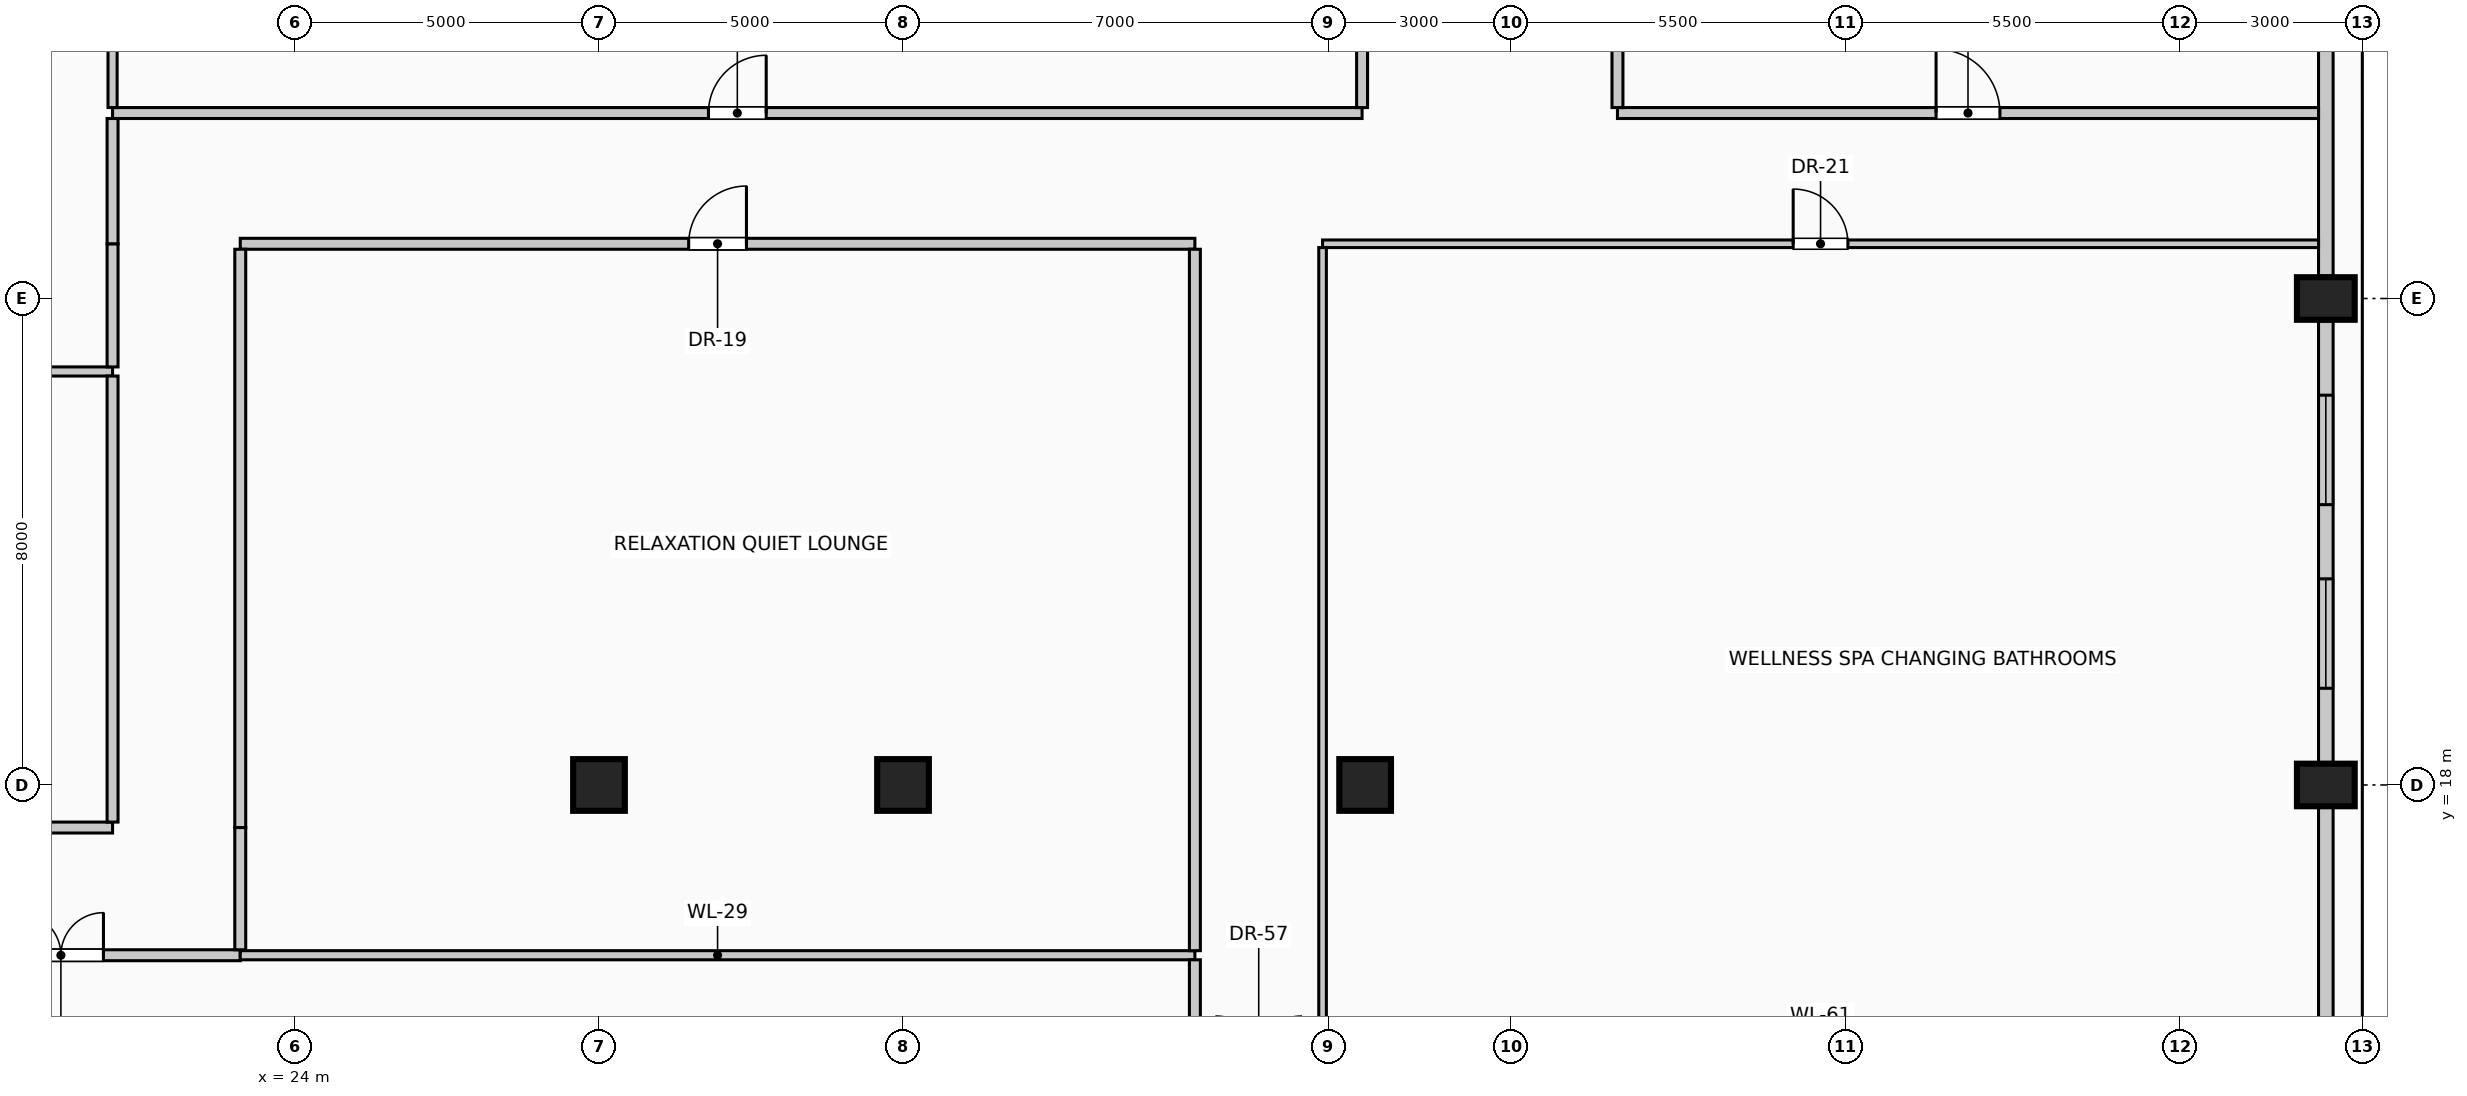
"""IFC4 building model, lengths in metres.
Left out: names, types, materials, properties, quantities, classifications, styles, units other than length and angle.
Written with IfcOpenShell. Run it as: python <this file> out.ifc"""

import sys

from ifc_helpers import new_model, si_unit, direction, frame, frame_2d, origin, origin_2d, place, context, subcontext, project, spatial, rectangle, circle, extrude, element, fill, save


model = new_model("IFC4")
c1 = context("Model", 3, precision=1e-05, world=origin(), true_north=direction((0.0, 1.0)))
c2 = subcontext(c1, "Body", "Model", "MODEL_VIEW")
j1 = project(units=[si_unit("LENGTHUNIT", "METRE"), si_unit("PLANEANGLEUNIT", "RADIAN")], contexts=[c1])
p1 = place(None, origin())
s1 = spatial("IfcSite", under=j1, at=p1, CompositionType="ELEMENT")
p2 = place(p1, origin())
s2 = spatial("IfcBuilding", under=s1, at=p2, CompositionType="ELEMENT")
p3 = place(p2, frame((0.0, 0.0, 280.6)))
s3 = spatial("IfcBuildingStorey", under=s2, at=p3, CompositionType="ELEMENT", Elevation=280.6)
for number, where, z_axis, x_axis in (
    (1, (57.4, 18.0, 0.0), (0.0, 0.0, 1.0), (0.0, 1.0, 0.0)),
    (2, (57.4, 26.0, 0.0), (0.0, 0.0, 1.0), (0.0, 1.0, 0.0)),
):
    element("IfcColumn", number, at=place(p3, frame(where, z_axis=z_axis, x_axis=x_axis)), inside=s3, PredefinedType="COLUMN", context=c2, shape_type="SweptSolid", body=[
        extrude(rectangle(XDim=0.7, YDim=0.95, at=origin_2d()), origin(), (0.0, 0.0, 1.0), 4.4),
    ])
for number, where, z_axis, x_axis in (
    (3, (29.0, 18.0, 0.0), (0.0, 0.0, 1.0), (1.0, 0.0, 0.0)),
    (4, (41.6, 18.0, 0.0), (0.0, 0.0, 1.0), (1.0, 0.0, 0.0)),
    (5, (34.0, 18.0, 0.0), (0.0, 0.0, 1.0), (1.0, 0.0, 0.0)),
):
    element("IfcColumn", number, at=place(p3, frame(where, z_axis=z_axis, x_axis=x_axis)), inside=s3, PredefinedType="COLUMN", context=c2, shape_type="SweptSolid", body=[
        extrude(circle(Radius=0.425, at=origin_2d()), origin(), (0.0, 0.0, 1.0), 4.4),
    ])
p4 = place(p3, frame((57.4, 17.63, 0.0), z_axis=(0.0, 0.0, 1.0), x_axis=(0.0, -1.0, 0.0)))
e6 = element("IfcWall", 6, at=p4, inside=s3, PredefinedType="SOLIDWALL", context=c2, shape_type="SweptSolid", body=[
    extrude(rectangle(XDim=7.26, YDim=0.24, at=frame_2d((3.63, 0.0))), origin(), (0.0, 0.0, 1.0), 3.4),
])
p5 = place(p3, frame((57.4, 25.63, 0.0), z_axis=(0.0, 0.0, 1.0), x_axis=(0.0, -1.0, 0.0)))
e7 = element("IfcWall", 7, at=p5, inside=s3, PredefinedType="SOLIDWALL", context=c2, shape_type="SweptSolid", body=[
    extrude(rectangle(XDim=7.26, YDim=0.24, at=frame_2d((3.63, 0.0))), origin(), (0.0, 0.0, 1.0), 3.4),
])
p6 = place(p5, frame((1.22, 0.0, 0.42)))
e8 = element("IfcOpeningElement", 8, at=p6, cuts=e7, PredefinedType="OPENING", context=c2, shape_type="SweptSolid", body=[
    extrude(rectangle(XDim=1.8, YDim=2.2, at=frame_2d((0.9, 1.1))), frame((0.0, 0.13, 0.0), z_axis=(0.0, -1.0, 0.0), x_axis=(1.0, 0.0, 0.0)), (0.0, 0.0, 1.0), 0.26),
])
p7 = place(p5, frame((4.24, 0.0, 0.42)))
e9 = element("IfcOpeningElement", 9, at=p7, cuts=e7, PredefinedType="OPENING", context=c2, shape_type="SweptSolid", body=[
    extrude(rectangle(XDim=1.8, YDim=2.2, at=frame_2d((0.9, 1.1))), frame((0.0, 0.13, 0.0), z_axis=(0.0, -1.0, 0.0), x_axis=(1.0, 0.0, 0.0)), (0.0, 0.0, 1.0), 0.26),
])
p8 = place(p3, frame((57.4, 33.63, 0.0), z_axis=(0.0, 0.0, 1.0), x_axis=(0.0, -1.0, 0.0)))
e10 = element("IfcWall", 10, at=p8, inside=s3, PredefinedType="SOLIDWALL", context=c2, shape_type="SweptSolid", body=[
    extrude(rectangle(XDim=7.26, YDim=0.24, at=frame_2d((3.63, 0.0))), origin(), (0.0, 0.0, 1.0), 3.4),
])
p9 = place(p3, frame((17.2, 15.2, 0.0), z_axis=(0.0, 0.0, 1.0), x_axis=(1.0, 0.0, 0.0)))
e11 = element("IfcWall", 11, at=p9, inside=s3, PredefinedType="PARTITIONING", context=c2, shape_type="SweptSolid", body=[
    extrude(rectangle(XDim=5.9, YDim=0.18, at=frame_2d((2.95, 0.0))), origin(), (0.0, 0.0, 1.0), 4.15),
])
p10 = place(p9, frame((2.25, 0.0, 0.0)))
e12 = element("IfcOpeningElement", 12, at=p10, cuts=e11, PredefinedType="OPENING", context=c2, shape_type="SweptSolid", body=[
    extrude(rectangle(XDim=1.4, YDim=2.2, at=frame_2d((0.7, 1.1))), frame((0.0, 0.1, 0.0), z_axis=(0.0, -1.0, 0.0), x_axis=(1.0, 0.0, 0.0)), (0.0, 0.0, 1.0), 0.2),
])
p11 = place(p3, frame((23.1, 15.2, 0.0), z_axis=(0.0, 0.0, 1.0), x_axis=(1.0, 0.0, 0.0)))
e13 = element("IfcWall", 13, at=p11, inside=s3, PredefinedType="PARTITIONING", context=c2, shape_type="SweptSolid", body=[
    extrude(rectangle(XDim=15.7, YDim=0.15, at=frame_2d((7.85, 0.0))), origin(), (0.0, 0.0, 1.0), 4.15),
])
p12 = place(p3, frame((15.85, 17.3, 0.0), z_axis=(0.0, 0.0, 1.0), x_axis=(1.0, 0.0, 0.0)))
e14 = element("IfcWall", 14, at=p12, inside=s3, PredefinedType="PARTITIONING", context=c2, shape_type="SweptSolid", body=[
    extrude(rectangle(XDim=5.15, YDim=0.18, at=frame_2d((2.575, 0.0))), origin(), (0.0, 0.0, 1.0), 4.15),
])
p13 = place(p12, frame((2.41, 0.0, 0.0)))
e15 = element("IfcOpeningElement", 15, at=p13, cuts=e14, PredefinedType="OPENING", context=c2, shape_type="SweptSolid", body=[
    extrude(rectangle(XDim=1.05, YDim=2.15, at=frame_2d((0.525, 1.075))), frame((0.0, 0.1, 0.0), z_axis=(0.0, -1.0, 0.0), x_axis=(1.0, 0.0, 0.0)), (0.0, 0.0, 1.0), 0.2),
])
p14 = place(p3, frame((15.85, 24.8, 0.0), z_axis=(0.0, 0.0, 1.0), x_axis=(1.0, 0.0, 0.0)))
e16 = element("IfcWall", 16, at=p14, inside=s3, PredefinedType="PARTITIONING", context=c2, shape_type="SweptSolid", body=[
    extrude(rectangle(XDim=5.15, YDim=0.15, at=frame_2d((2.575, 0.0))), origin(), (0.0, 0.0, 1.0), 4.15),
])
p15 = place(p3, frame((23.1, 26.9, 0.0), z_axis=(0.0, 0.0, 1.0), x_axis=(1.0, 0.0, 0.0)))
e17 = element("IfcWall", 17, at=p15, inside=s3, PredefinedType="PARTITIONING", context=c2, shape_type="SweptSolid", body=[
    extrude(rectangle(XDim=15.7, YDim=0.18, at=frame_2d((7.85, 0.0))), origin(), (0.0, 0.0, 1.0), 4.15),
])
p16 = place(p15, frame((7.375, 0.0, 0.0)))
e18 = element("IfcOpeningElement", 18, at=p16, cuts=e17, PredefinedType="OPENING", context=c2, shape_type="SweptSolid", body=[
    extrude(rectangle(XDim=0.95, YDim=2.15, at=frame_2d((0.475, 1.075))), frame((0.0, 0.1, 0.0), z_axis=(0.0, -1.0, 0.0), x_axis=(1.0, 0.0, 0.0)), (0.0, 0.0, 1.0), 0.2),
])
p17 = place(p3, frame((40.9, 26.9, 0.0), z_axis=(0.0, 0.0, 1.0), x_axis=(1.0, 0.0, 0.0)))
e19 = element("IfcWall", 19, at=p17, inside=s3, PredefinedType="PARTITIONING", context=c2, shape_type="SweptSolid", body=[
    extrude(rectangle(XDim=16.38, YDim=0.125, at=frame_2d((8.19, 0.0))), origin(), (0.0, 0.0, 1.0), 4.15),
])
p18 = place(p17, frame((7.74, 0.0, 0.0)))
e20 = element("IfcOpeningElement", 20, at=p18, cuts=e19, PredefinedType="OPENING", context=c2, shape_type="SweptSolid", body=[
    extrude(rectangle(XDim=0.9, YDim=2.1, at=frame_2d((0.45, 1.05))), frame((0.0, 0.073, 0.0), z_axis=(0.0, -1.0, 0.0), x_axis=(1.0, 0.0, 0.0)), (0.0, 0.0, 1.0), 0.145),
])
p19 = place(p3, frame((21.0, 29.05, 0.0), z_axis=(0.0, 0.0, 1.0), x_axis=(1.0, 0.0, 0.0)))
e21 = element("IfcWall", 21, at=p19, inside=s3, PredefinedType="PARTITIONING", context=c2, shape_type="SweptSolid", body=[
    extrude(rectangle(XDim=20.55, YDim=0.18, at=frame_2d((10.275, 0.0))), origin(), (0.0, 0.0, 1.0), 4.15),
])
p20 = place(p19, frame((9.8, 0.0, 0.0)))
e22 = element("IfcOpeningElement", 22, at=p20, cuts=e21, PredefinedType="OPENING", context=c2, shape_type="SweptSolid", body=[
    extrude(rectangle(XDim=0.95, YDim=2.15, at=frame_2d((0.475, 1.075))), frame((0.0, 0.1, 0.0), z_axis=(0.0, -1.0, 0.0), x_axis=(1.0, 0.0, 0.0)), (0.0, 0.0, 1.0), 0.2),
])
p21 = place(p3, frame((45.75, 29.05, 0.0), z_axis=(0.0, 0.0, 1.0), x_axis=(1.0, 0.0, 0.0)))
e23 = element("IfcWall", 23, at=p21, inside=s3, PredefinedType="PARTITIONING", context=c2, shape_type="SweptSolid", body=[
    extrude(rectangle(XDim=11.53, YDim=0.18, at=frame_2d((5.765, 0.0))), origin(), (0.0, 0.0, 1.0), 4.15),
])
p22 = place(p21, frame((5.24, 0.0, 0.0)))
e24 = element("IfcOpeningElement", 24, at=p22, cuts=e23, PredefinedType="OPENING", context=c2, shape_type="SweptSolid", body=[
    extrude(rectangle(XDim=1.05, YDim=2.15, at=frame_2d((0.525, 1.075))), frame((0.0, 0.1, 0.0), z_axis=(0.0, -1.0, 0.0), x_axis=(1.0, 0.0, 0.0)), (0.0, 0.0, 1.0), 0.2),
])
p23 = place(p3, frame((21.0, 17.39, 0.0), z_axis=(0.0, 0.0, 1.0), x_axis=(0.0, 1.0, 0.0)))
e25 = element("IfcWall", 25, at=p23, inside=s3, PredefinedType="PARTITIONING", context=c2, shape_type="SweptSolid", body=[
    extrude(rectangle(XDim=7.335, YDim=0.18, at=frame_2d((3.667, 0.0))), origin(), (0.0, 0.0, 1.0), 4.15),
])
p24 = place(p3, frame((21.0, 24.875, 0.0), z_axis=(0.0, 0.0, 1.0), x_axis=(0.0, 1.0, 0.0)))
e26 = element("IfcWall", 26, at=p24, inside=s3, PredefinedType="PARTITIONING", context=c2, shape_type="SweptSolid", body=[
    extrude(rectangle(XDim=2.025, YDim=0.18, at=frame_2d((1.012, 0.0))), origin(), (0.0, 0.0, 1.0), 4.15),
])
p25 = place(p3, frame((21.0, 26.9, 0.0), z_axis=(0.0, 0.0, 1.0), x_axis=(0.0, 1.0, 0.0)))
e27 = element("IfcWall", 27, at=p25, inside=s3, PredefinedType="PARTITIONING", context=c2, shape_type="SweptSolid", body=[
    extrude(rectangle(XDim=2.06, YDim=0.18, at=frame_2d((1.03, 0.0))), origin(), (0.0, 0.0, 1.0), 4.15),
])
p26 = place(p3, frame((21.0, 29.14, 0.0), z_axis=(0.0, 0.0, 1.0), x_axis=(0.0, 1.0, 0.0)))
e28 = element("IfcWall", 28, at=p26, inside=s3, PredefinedType="PARTITIONING", context=c2, shape_type="SweptSolid", body=[
    extrude(rectangle(XDim=3.135, YDim=0.15, at=frame_2d((1.567, 0.0))), origin(), (0.0, 0.0, 1.0), 4.15),
])
p27 = place(p3, frame((23.1, 15.29, 0.0), z_axis=(0.0, 0.0, 1.0), x_axis=(0.0, 1.0, 0.0)))
e29 = element("IfcWall", 29, at=p27, inside=s3, PredefinedType="PARTITIONING", context=c2, shape_type="SweptSolid", body=[
    extrude(rectangle(XDim=2.01, YDim=0.18, at=frame_2d((1.005, 0.0))), origin(), (0.0, 0.0, 1.0), 4.15),
])
p28 = place(p3, frame((23.1, 17.3, 0.0), z_axis=(0.0, 0.0, 1.0), x_axis=(0.0, 1.0, 0.0)))
e30 = element("IfcWall", 30, at=p28, inside=s3, PredefinedType="PARTITIONING", context=c2, shape_type="SweptSolid", body=[
    extrude(rectangle(XDim=9.51, YDim=0.18, at=frame_2d((4.755, 0.0))), origin(), (0.0, 0.0, 1.0), 4.15),
])
p29 = place(p3, frame((38.8, 13.59, 0.0), z_axis=(0.0, 0.0, 1.0), x_axis=(0.0, 1.0, 0.0)))
e31 = element("IfcWall", 31, at=p29, inside=s3, PredefinedType="PARTITIONING", context=c2, shape_type="SweptSolid", body=[
    extrude(rectangle(XDim=1.535, YDim=0.18, at=frame_2d((0.768, 0.0))), origin(), (0.0, 0.0, 1.0), 4.15),
])
p30 = place(p3, frame((38.8, 15.275, 0.0), z_axis=(0.0, 0.0, 1.0), x_axis=(0.0, 1.0, 0.0)))
e32 = element("IfcWall", 32, at=p30, inside=s3, PredefinedType="PARTITIONING", context=c2, shape_type="SweptSolid", body=[
    extrude(rectangle(XDim=11.535, YDim=0.18, at=frame_2d((5.768, 0.0))), origin(), (0.0, 0.0, 1.0), 4.15),
])
p31 = place(p3, frame((40.9, 13.59, 0.0), z_axis=(0.0, 0.0, 1.0), x_axis=(0.0, 1.0, 0.0)))
e33 = element("IfcWall", 33, at=p31, inside=s3, PredefinedType="PARTITIONING", context=c2, shape_type="SweptSolid", body=[
    extrude(rectangle(XDim=13.247, YDim=0.125, at=frame_2d((6.624, 0.0))), origin(), (0.0, 0.0, 1.0), 4.15),
])
p32 = place(p3, frame((41.55, 29.14, 0.0), z_axis=(0.0, 0.0, 1.0), x_axis=(0.0, 1.0, 0.0)))
e34 = element("IfcWall", 34, at=p32, inside=s3, PredefinedType="PARTITIONING", context=c2, shape_type="SweptSolid", body=[
    extrude(rectangle(XDim=3.21, YDim=0.18, at=frame_2d((1.605, 0.0))), origin(), (0.0, 0.0, 1.0), 3.595),
])
p33 = place(p3, frame((45.75, 29.14, 0.0), z_axis=(0.0, 0.0, 1.0), x_axis=(0.0, 1.0, 0.0)))
e35 = element("IfcWall", 35, at=p33, inside=s3, PredefinedType="PARTITIONING", context=c2, shape_type="SweptSolid", body=[
    extrude(rectangle(XDim=3.135, YDim=0.18, at=frame_2d((1.567, 0.0))), origin(), (0.0, 0.0, 1.0), 4.15),
])
p34 = place(p6, origin())
e36 = element("IfcWindow", 36, at=p34, inside=s3, PartitioningType="SINGLE_PANEL", PredefinedType="WINDOW", context=c2, shape_type="SweptSolid", body=[
    extrude(rectangle(XDim=1.8, YDim=2.2, at=frame_2d((0.9, 1.1))), frame((0.0, 0.03, 0.0), z_axis=(0.0, -1.0, 0.0), x_axis=(1.0, 0.0, 0.0)), (0.0, 0.0, 1.0), 0.06),
])
fill(e8, e36)
p35 = place(p7, origin())
e37 = element("IfcWindow", 37, at=p35, inside=s3, PartitioningType="SINGLE_PANEL", PredefinedType="WINDOW", context=c2, shape_type="SweptSolid", body=[
    extrude(rectangle(XDim=1.8, YDim=2.2, at=frame_2d((0.9, 1.1))), frame((0.0, 0.03, 0.0), z_axis=(0.0, -1.0, 0.0), x_axis=(1.0, 0.0, 0.0)), (0.0, 0.0, 1.0), 0.06),
])
fill(e9, e37)
p36 = place(p10, origin())
e38 = element("IfcDoor", 38, at=p36, inside=s3, OperationType="DOUBLE_DOOR_SINGLE_SWING", PredefinedType="DOOR", context=c2, shape_type="SweptSolid", body=[
    extrude(rectangle(XDim=1.4, YDim=2.2, at=frame_2d((0.7, 1.1))), frame((0.0, 0.025, 0.0), z_axis=(0.0, -1.0, 0.0), x_axis=(1.0, 0.0, 0.0)), (0.0, 0.0, 1.0), 0.05),
])
fill(e12, e38)
p37 = place(p16, origin())
e39 = element("IfcDoor", 39, at=p37, inside=s3, OperationType="SINGLE_SWING_RIGHT", PredefinedType="DOOR", context=c2, shape_type="SweptSolid", body=[
    extrude(rectangle(XDim=0.95, YDim=2.15, at=frame_2d((0.475, 1.075))), frame((0.0, 0.025, 0.0), z_axis=(0.0, -1.0, 0.0), x_axis=(1.0, 0.0, 0.0)), (0.0, 0.0, 1.0), 0.05),
])
fill(e18, e39)
p38 = place(p18, origin())
e40 = element("IfcDoor", 40, at=p38, inside=s3, OperationType="SINGLE_SWING_LEFT", PredefinedType="DOOR", context=c2, shape_type="SweptSolid", body=[
    extrude(rectangle(XDim=0.9, YDim=2.1, at=frame_2d((0.45, 1.05))), frame((0.0, 0.025, 0.0), z_axis=(0.0, -1.0, 0.0), x_axis=(1.0, 0.0, 0.0)), (0.0, 0.0, 1.0), 0.05),
])
fill(e20, e40)
p39 = place(p20, origin())
e41 = element("IfcDoor", 41, at=p39, inside=s3, OperationType="SINGLE_SWING_RIGHT", PredefinedType="DOOR", context=c2, shape_type="SweptSolid", body=[
    extrude(rectangle(XDim=0.95, YDim=2.15, at=frame_2d((0.475, 1.075))), frame((0.0, 0.025, 0.0), z_axis=(0.0, -1.0, 0.0), x_axis=(1.0, 0.0, 0.0)), (0.0, 0.0, 1.0), 0.05),
])
fill(e22, e41)
p40 = place(p22, origin())
e42 = element("IfcDoor", 42, at=p40, inside=s3, OperationType="SINGLE_SWING_LEFT", PredefinedType="DOOR", context=c2, shape_type="SweptSolid", body=[
    extrude(rectangle(XDim=1.05, YDim=2.15, at=frame_2d((0.525, 1.075))), frame((0.0, 0.025, 0.0), z_axis=(0.0, -1.0, 0.0), x_axis=(1.0, 0.0, 0.0)), (0.0, 0.0, 1.0), 0.05),
])
fill(e24, e42)
save(model, sys.argv[1])
